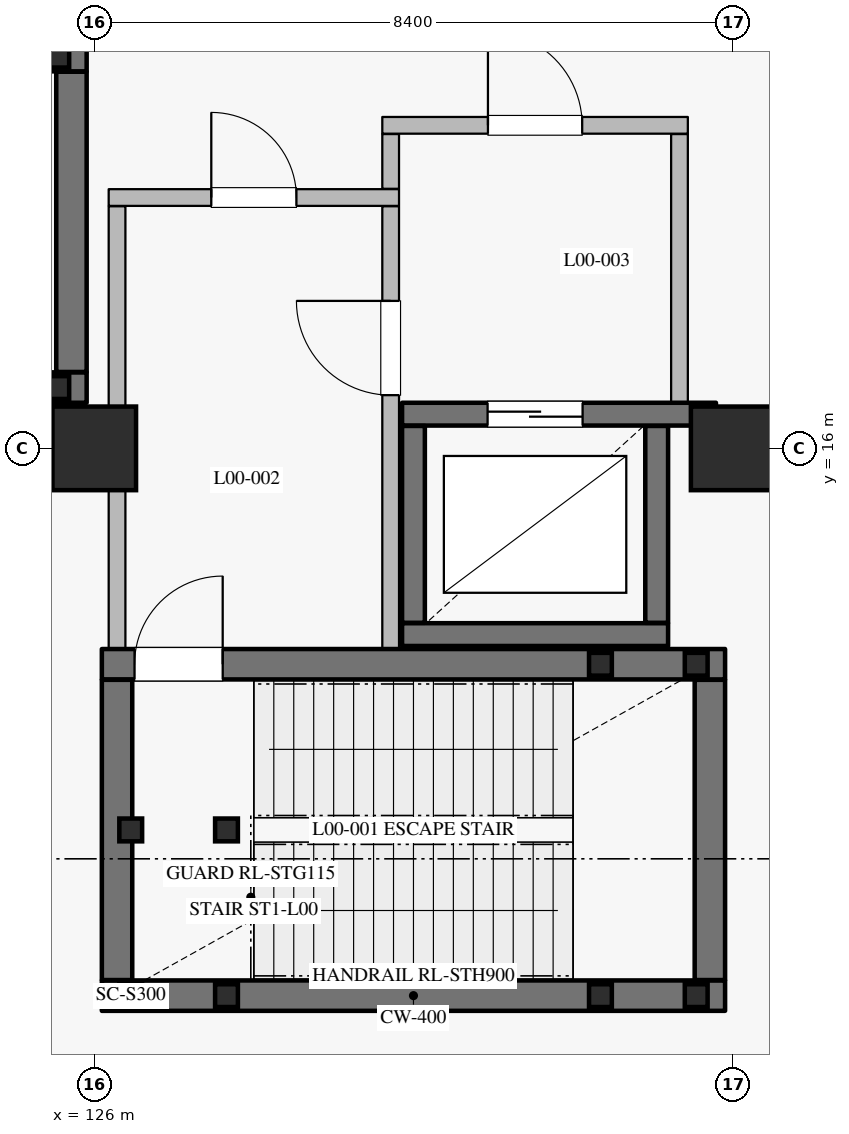
"""IFC4 building model, lengths in metres.
Left out: names, types, materials, properties, quantities, classifications, styles, units other than length and angle.
Written with IfcOpenShell. Run it as: python <this file> out.ifc"""

import sys

from ifc_helpers import new_model, si_unit, direction, frame, frame_2d, origin, origin_2d, place, context, subcontext, project, spatial, rectangle, hollow_rectangle, circle, extrude, element, fill, save


model = new_model("IFC4")
c1 = context("Model", 3, precision=1e-05, world=origin(), true_north=direction((0.0, 1.0)))
c2 = subcontext(c1, "Body", "Model", "MODEL_VIEW")
j1 = project(units=[si_unit("LENGTHUNIT", "METRE"), si_unit("PLANEANGLEUNIT", "RADIAN")], contexts=[c1])
p1 = place(None, origin())
s1 = spatial("IfcSite", under=j1, at=p1, CompositionType="ELEMENT")
p2 = place(p1, origin())
s2 = spatial("IfcBuilding", under=s1, at=p2, CompositionType="ELEMENT")
p3 = place(p2, origin())
s3 = spatial("IfcBuildingStorey", under=s2, at=p3, CompositionType="ELEMENT", Elevation=0.0)
for number, where, z_axis, x_axis in (
    (1, (126.0, 16.0, 0.0), (0.0, 0.0, 1.0), (1.0, 0.0, 0.0)),
    (2, (134.4, 16.0, 0.0), (0.0, 0.0, 1.0), (1.0, 0.0, 0.0)),
):
    element("IfcColumn", number, at=place(p3, frame(where, z_axis=z_axis, x_axis=x_axis)), inside=s3, PredefinedType="COLUMN", context=c2, shape_type="SweptSolid", body=[
        extrude(circle(Radius=0.55, at=origin_2d()), origin(), (0.0, 0.0, 1.0), 6.0),
    ])
p4 = place(p3, frame((130.05, 13.55, 0.0), z_axis=(0.0, 0.0, 1.0), x_axis=(1.0, 0.0, 0.0)))
e3 = element("IfcWall", 3, at=p4, inside=s3, PredefinedType="SHEAR", context=c2, shape_type="SweptSolid", body=[
    extrude(rectangle(XDim=3.5, YDim=0.3, at=frame_2d((1.75, 0.0))), origin(), (0.0, 0.0, 1.0), 5.675),
])
p5 = place(p3, frame((133.4, 13.705, 0.0), z_axis=(0.0, 0.0, 1.0), x_axis=(0.0, 1.0, 0.0)))
e4 = element("IfcWall", 4, at=p5, inside=s3, PredefinedType="SHEAR", context=c2, shape_type="SweptSolid", body=[
    extrude(rectangle(XDim=2.59, YDim=0.3, at=frame_2d((1.295, 0.0))), origin(), (0.0, 0.0, 1.0), 5.675),
])
p6 = place(p3, frame((134.18, 16.45, 0.0), z_axis=(0.0, 0.0, 1.0), x_axis=(-1.0, 0.0, 0.0)))
e5 = element("IfcWall", 5, at=p6, inside=s3, PredefinedType="SHEAR", context=c2, shape_type="SweptSolid", body=[
    extrude(rectangle(XDim=4.13, YDim=0.3, at=frame_2d((2.065, 0.0))), origin(), (0.0, 0.0, 1.0), 5.675),
])
p7 = place(p6, frame((1.755, 0.0, 0.0)))
e6 = element("IfcOpeningElement", 6, at=p7, cuts=e5, PredefinedType="OPENING", context=c2, shape_type="SweptSolid", body=[
    extrude(rectangle(XDim=1.25, YDim=2.25, at=frame_2d((0.625, 1.125))), frame((0.0, 0.16, 0.0), z_axis=(0.0, -1.0, 0.0), x_axis=(1.0, 0.0, 0.0)), (0.0, 0.0, 1.0), 0.32),
])
p8 = place(p3, frame((130.2, 16.295, 0.0), z_axis=(0.0, 0.0, 1.0), x_axis=(0.0, -1.0, 0.0)))
e7 = element("IfcWall", 7, at=p8, inside=s3, PredefinedType="SHEAR", context=c2, shape_type="SweptSolid", body=[
    extrude(rectangle(XDim=2.59, YDim=0.3, at=frame_2d((1.295, 0.0))), origin(), (0.0, 0.0, 1.0), 5.675),
])
p9 = place(p3, frame((126.1, 8.8, 0.0), z_axis=(0.0, 0.0, 1.0), x_axis=(1.0, 0.0, 0.0)))
e8 = element("IfcWall", 8, at=p9, inside=s3, PredefinedType="SHEAR", context=c2, shape_type="SweptSolid", body=[
    extrude(rectangle(XDim=8.2, YDim=0.4, at=frame_2d((4.1, 0.0))), origin(), (0.0, 0.0, 1.0), 5.675),
])
p10 = place(p3, frame((134.1, 9.005, 0.0), z_axis=(0.0, 0.0, 1.0), x_axis=(0.0, 1.0, 0.0)))
e9 = element("IfcWall", 9, at=p10, inside=s3, PredefinedType="SHEAR", context=c2, shape_type="SweptSolid", body=[
    extrude(rectangle(XDim=3.95, YDim=0.4, at=frame_2d((1.975, 0.0))), origin(), (0.0, 0.0, 1.0), 5.675),
])
p11 = place(p3, frame((126.1, 13.16, 0.0), z_axis=(0.0, 0.0, 1.0), x_axis=(1.0, 0.0, 0.0)))
e10 = element("IfcWall", 10, at=p11, inside=s3, PredefinedType="SHEAR", context=c2, shape_type="SweptSolid", body=[
    extrude(rectangle(XDim=8.2, YDim=0.4, at=frame_2d((4.1, 0.0))), origin(), (0.0, 0.0, 1.0), 5.675),
])
p12 = place(p11, frame((0.43, 0.0, 0.0)))
e11 = element("IfcOpeningElement", 11, at=p12, cuts=e10, PredefinedType="OPENING", context=c2, shape_type="SweptSolid", body=[
    extrude(rectangle(XDim=1.16, YDim=2.2, at=frame_2d((0.58, 1.1))), frame((0.0, 0.21, 0.0), z_axis=(0.0, -1.0, 0.0), x_axis=(1.0, 0.0, 0.0)), (0.0, 0.0, 1.0), 0.42),
])
p13 = place(p3, frame((126.3, 9.005, 0.0), z_axis=(0.0, 0.0, 1.0), x_axis=(0.0, 1.0, 0.0)))
e12 = element("IfcWall", 12, at=p13, inside=s3, PredefinedType="SHEAR", context=c2, shape_type="SweptSolid", body=[
    extrude(rectangle(XDim=3.95, YDim=0.4, at=frame_2d((1.975, 0.0))), origin(), (0.0, 0.0, 1.0), 5.675),
])
p14 = place(p3, frame((126.3, 13.365, 0.0), z_axis=(0.0, 0.0, 1.0), x_axis=(0.0, 1.0, 0.0)))
e13 = element("IfcWall", 13, at=p14, inside=s3, PredefinedType="PARTITIONING", context=c2, shape_type="SweptSolid", body=[
    extrude(rectangle(XDim=5.82, YDim=0.22, at=frame_2d((2.91, 0.0))), origin(), (0.0, 0.0, 1.0), 4.75),
])
p15 = place(p3, frame((126.19, 19.3, 0.0), z_axis=(0.0, 0.0, 1.0), x_axis=(1.0, 0.0, 0.0)))
e14 = element("IfcWall", 14, at=p15, inside=s3, PredefinedType="PARTITIONING", context=c2, shape_type="SweptSolid", body=[
    extrude(rectangle(XDim=3.82, YDim=0.22, at=frame_2d((1.91, 0.0))), origin(), (0.0, 0.0, 1.0), 5.675),
])
p16 = place(p15, frame((1.35, 0.0, 0.0)))
e15 = element("IfcOpeningElement", 15, at=p16, cuts=e14, PredefinedType="OPENING", context=c2, shape_type="SweptSolid", body=[
    extrude(rectangle(XDim=1.12, YDim=2.2, at=frame_2d((0.56, 1.1))), frame((0.0, 0.12, 0.0), z_axis=(0.0, -1.0, 0.0), x_axis=(1.0, 0.0, 0.0)), (0.0, 0.0, 1.0), 0.24),
])
p17 = place(p3, frame((129.9, 13.365, 0.0), z_axis=(0.0, 0.0, 1.0), x_axis=(0.0, 1.0, 0.0)))
e16 = element("IfcWall", 16, at=p17, inside=s3, PredefinedType="PARTITIONING", context=c2, shape_type="SweptSolid", body=[
    extrude(rectangle(XDim=5.82, YDim=0.22, at=frame_2d((2.91, 0.0))), origin(), (0.0, 0.0, 1.0), 5.675),
])
p18 = place(p17, frame((3.335, 0.0, 0.0)))
e17 = element("IfcOpeningElement", 17, at=p18, cuts=e16, PredefinedType="OPENING", context=c2, shape_type="SweptSolid", body=[
    extrude(rectangle(XDim=1.24, YDim=2.2, at=frame_2d((0.62, 1.1))), frame((0.0, 0.12, 0.0), z_axis=(0.0, -1.0, 0.0), x_axis=(1.0, 0.0, 0.0)), (0.0, 0.0, 1.0), 0.24),
])
p19 = place(p3, frame((129.9, 19.415, 0.0), z_axis=(0.0, 0.0, 1.0), x_axis=(0.0, 1.0, 0.0)))
e18 = element("IfcWall", 18, at=p19, inside=s3, PredefinedType="PARTITIONING", context=c2, shape_type="SweptSolid", body=[
    extrude(rectangle(XDim=0.72, YDim=0.22, at=frame_2d((0.36, 0.0))), origin(), (0.0, 0.0, 1.0), 5.675),
])
p20 = place(p3, frame((133.7, 16.605, 0.0), z_axis=(0.0, 0.0, 1.0), x_axis=(0.0, 1.0, 0.0)))
e19 = element("IfcWall", 19, at=p20, inside=s3, PredefinedType="PARTITIONING", context=c2, shape_type="SweptSolid", body=[
    extrude(rectangle(XDim=3.53, YDim=0.22, at=frame_2d((1.765, 0.0))), origin(), (0.0, 0.0, 1.0), 5.675),
])
p21 = place(p3, frame((129.79, 20.25, 0.0), z_axis=(0.0, 0.0, 1.0), x_axis=(1.0, 0.0, 0.0)))
e20 = element("IfcWall", 20, at=p21, inside=s3, PredefinedType="PARTITIONING", context=c2, shape_type="SweptSolid", body=[
    extrude(rectangle(XDim=4.02, YDim=0.22, at=frame_2d((2.01, 0.0))), origin(), (0.0, 0.0, 1.0), 5.675),
])
p22 = place(p21, frame((1.39, 0.0, 0.0)))
e21 = element("IfcOpeningElement", 21, at=p22, cuts=e20, PredefinedType="OPENING", context=c2, shape_type="SweptSolid", body=[
    extrude(rectangle(XDim=1.24, YDim=2.2, at=frame_2d((0.62, 1.1))), frame((0.0, 0.12, 0.0), z_axis=(0.0, -1.0, 0.0), x_axis=(1.0, 0.0, 0.0)), (0.0, 0.0, 1.0), 0.24),
])
for number, where, z_axis, x_axis in (
    (22, (126.48, 8.8, 0.0), (0.0, 0.0, 1.0), (1.0, 0.0, 0.0)),
    (23, (126.48, 10.98, 0.0), (0.0, 0.0, 1.0), (1.0, 0.0, 0.0)),
    (24, (127.74, 8.8, 0.0), (0.0, 0.0, 1.0), (1.0, 0.0, 0.0)),
    (25, (127.74, 10.98, 0.0), (0.0, 0.0, 1.0), (1.0, 0.0, 0.0)),
):
    element("IfcColumn", number, at=place(p3, frame(where, z_axis=z_axis, x_axis=x_axis)), inside=s3, PredefinedType="COLUMN", context=c2, shape_type="SweptSolid", body=[
        extrude(hollow_rectangle(XDim=0.3, YDim=0.3, WallThickness=0.012, at=origin_2d()), origin(), (0.0, 0.0, 1.0), 5.82),
    ])
for number, where, z_axis, x_axis in (
    (26, (132.66, 8.8, -2.7), (0.0, 0.0, 1.0), (1.0, 0.0, 0.0)),
    (27, (132.66, 13.16, -2.7), (0.0, 0.0, 1.0), (1.0, 0.0, 0.0)),
    (28, (133.92, 8.8, -2.7), (0.0, 0.0, 1.0), (1.0, 0.0, 0.0)),
    (29, (133.92, 13.16, -2.7), (0.0, 0.0, 1.0), (1.0, 0.0, 0.0)),
):
    element("IfcColumn", number, at=place(p3, frame(where, z_axis=z_axis, x_axis=x_axis)), inside=s3, PredefinedType="COLUMN", context=c2, shape_type="SweptSolid", body=[
        extrude(hollow_rectangle(XDim=0.3, YDim=0.3, WallThickness=0.012, at=origin_2d()), origin(), (0.0, 0.0, 1.0), 5.52),
    ])
p23 = place(p3, frame((117.7, 16.8, 0.0), z_axis=(0.0, 0.0, 1.0), x_axis=(1.0, 0.0, 0.0)))
e30 = element("IfcWall", 30, at=p23, inside=s3, PredefinedType="SHEAR", context=c2, shape_type="SweptSolid", body=[
    extrude(rectangle(XDim=8.2, YDim=0.4, at=frame_2d((4.1, 0.0))), origin(), (0.0, 0.0, 1.0), 5.675),
])
p24 = place(p3, frame((125.7, 17.005, 0.0), z_axis=(0.0, 0.0, 1.0), x_axis=(0.0, 1.0, 0.0)))
e31 = element("IfcWall", 31, at=p24, inside=s3, PredefinedType="SHEAR", context=c2, shape_type="SweptSolid", body=[
    extrude(rectangle(XDim=3.95, YDim=0.4, at=frame_2d((1.975, 0.0))), origin(), (0.0, 0.0, 1.0), 5.675),
])
p25 = place(p3, frame((117.7, 21.16, 0.0), z_axis=(0.0, 0.0, 1.0), x_axis=(1.0, 0.0, 0.0)))
e32 = element("IfcWall", 32, at=p25, inside=s3, PredefinedType="SHEAR", context=c2, shape_type="SweptSolid", body=[
    extrude(rectangle(XDim=8.2, YDim=0.4, at=frame_2d((4.1, 0.0))), origin(), (0.0, 0.0, 1.0), 5.675),
])
p26 = place(p25, frame((0.43, 0.0, 0.0)))
e33 = element("IfcOpeningElement", 33, at=p26, cuts=e32, PredefinedType="OPENING", context=c2, shape_type="SweptSolid", body=[
    extrude(rectangle(XDim=1.16, YDim=2.2, at=frame_2d((0.58, 1.1))), frame((0.0, 0.21, 0.0), z_axis=(0.0, -1.0, 0.0), x_axis=(1.0, 0.0, 0.0)), (0.0, 0.0, 1.0), 0.42),
])
for number, where, z_axis, x_axis in (
    (34, (125.52, 16.8, -2.7), (0.0, 0.0, 1.0), (1.0, 0.0, 0.0)),
    (35, (125.52, 21.16, -2.7), (0.0, 0.0, 1.0), (1.0, 0.0, 0.0)),
):
    element("IfcColumn", number, at=place(p3, frame(where, z_axis=z_axis, x_axis=x_axis)), inside=s3, PredefinedType="COLUMN", context=c2, shape_type="SweptSolid", body=[
        extrude(hollow_rectangle(XDim=0.3, YDim=0.3, WallThickness=0.012, at=origin_2d()), origin(), (0.0, 0.0, 1.0), 5.52),
    ])
p27 = place(p7, origin())
e36 = element("IfcDoor", 36, at=p27, inside=s3, OperationType="DOUBLE_DOOR_SLIDING", PredefinedType="DOOR", context=c2, shape_type="SweptSolid", body=[
    extrude(rectangle(XDim=1.25, YDim=2.25, at=frame_2d((0.625, 1.125))), frame((0.0, 0.025, 0.0), z_axis=(0.0, -1.0, 0.0), x_axis=(1.0, 0.0, 0.0)), (0.0, 0.0, 1.0), 0.05),
])
fill(e6, e36)
p28 = place(p12, origin())
e37 = element("IfcDoor", 37, at=p28, inside=s3, OperationType="SINGLE_SWING_RIGHT", PredefinedType="DOOR", context=c2, shape_type="SweptSolid", body=[
    extrude(rectangle(XDim=1.16, YDim=2.2, at=frame_2d((0.58, 1.1))), frame((0.0, 0.025, 0.0), z_axis=(0.0, -1.0, 0.0), x_axis=(1.0, 0.0, 0.0)), (0.0, 0.0, 1.0), 0.05),
])
fill(e11, e37)
p29 = place(p16, origin())
e38 = element("IfcDoor", 38, at=p29, inside=s3, OperationType="SINGLE_SWING_LEFT", PredefinedType="DOOR", context=c2, shape_type="SweptSolid", body=[
    extrude(rectangle(XDim=1.12, YDim=2.2, at=frame_2d((0.56, 1.1))), frame((0.0, 0.025, 0.0), z_axis=(0.0, -1.0, 0.0), x_axis=(1.0, 0.0, 0.0)), (0.0, 0.0, 1.0), 0.05),
])
fill(e15, e38)
p30 = place(p18, origin())
e39 = element("IfcDoor", 39, at=p30, inside=s3, OperationType="SINGLE_SWING_RIGHT", PredefinedType="DOOR", context=c2, shape_type="SweptSolid", body=[
    extrude(rectangle(XDim=1.24, YDim=2.2, at=frame_2d((0.62, 1.1))), frame((0.0, 0.025, 0.0), z_axis=(0.0, -1.0, 0.0), x_axis=(1.0, 0.0, 0.0)), (0.0, 0.0, 1.0), 0.05),
])
fill(e17, e39)
p31 = place(p22, origin())
e40 = element("IfcDoor", 40, at=p31, inside=s3, OperationType="SINGLE_SWING_LEFT", PredefinedType="DOOR", context=c2, shape_type="SweptSolid", body=[
    extrude(rectangle(XDim=1.24, YDim=2.2, at=frame_2d((0.62, 1.1))), frame((0.0, 0.025, 0.0), z_axis=(0.0, -1.0, 0.0), x_axis=(1.0, 0.0, 0.0)), (0.0, 0.0, 1.0), 0.05),
])
fill(e21, e40)
save(model, sys.argv[1])
